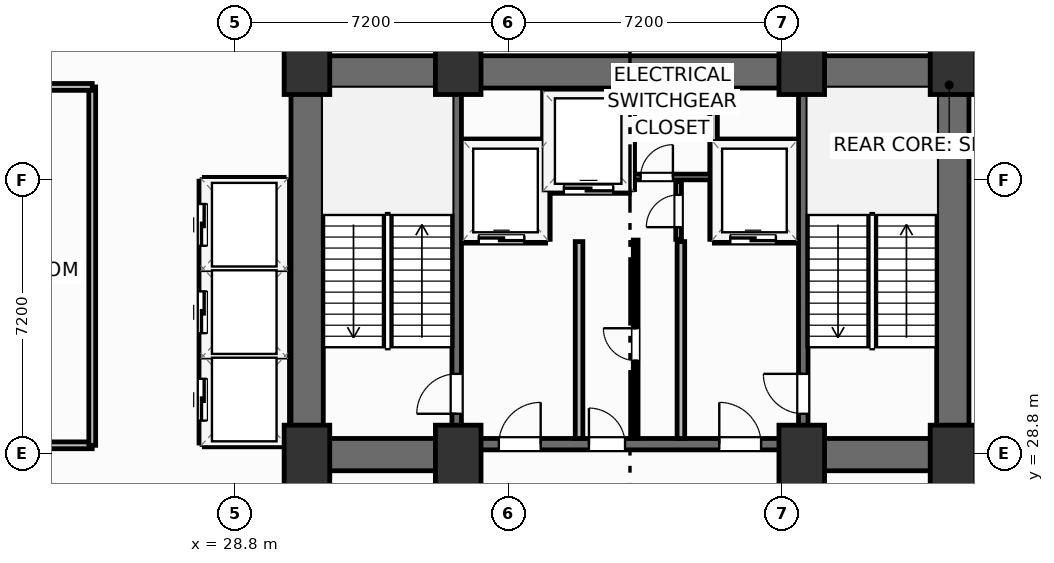
"""IFC4 building model, lengths in metres.
Left out: names, types, materials, properties, quantities, classifications, styles, units other than length and angle.
Written with IfcOpenShell. Run it as: python <this file> out.ifc"""

import sys

from ifc_helpers import new_model, si_unit, direction, frame, frame_2d, origin, origin_2d, place, context, subcontext, project, spatial, rectangle, extrude, element, fill, save


model = new_model("IFC4")
c1 = context("Model", 3, precision=1e-05, world=origin(), true_north=direction((0.0, 1.0)))
c2 = subcontext(c1, "Body", "Model", "MODEL_VIEW")
j1 = project(units=[si_unit("LENGTHUNIT", "METRE"), si_unit("PLANEANGLEUNIT", "RADIAN")], contexts=[c1])
p1 = place(None, origin())
s1 = spatial("IfcSite", under=j1, at=p1, CompositionType="ELEMENT")
p2 = place(p1, origin())
s2 = spatial("IfcBuilding", under=s1, at=p2, CompositionType="ELEMENT")
p3 = place(p2, frame((0.0, 0.0, -9.0)))
s3 = spatial("IfcBuildingStorey", under=s2, at=p3, CompositionType="ELEMENT", Elevation=-9.0)
for number, where, z_axis, x_axis in (
    (1, (30.7, 28.75, 0.0), (0.0, 0.0, 1.0), (1.0, 0.0, 0.0)),
    (2, (34.68, 28.75, 0.0), (0.0, 0.0, 1.0), (1.0, 0.0, 0.0)),
    (3, (43.72, 28.75, 0.0), (0.0, 0.0, 1.0), (1.0, 0.0, 0.0)),
    (4, (47.7, 28.75, 0.0), (0.0, 0.0, 1.0), (1.0, 0.0, 0.0)),
    (5, (30.7, 39.05, 0.0), (0.0, 0.0, 1.0), (1.0, 0.0, 0.0)),
    (6, (34.68, 39.05, 0.0), (0.0, 0.0, 1.0), (1.0, 0.0, 0.0)),
    (7, (43.72, 39.05, 0.0), (0.0, 0.0, 1.0), (1.0, 0.0, 0.0)),
    (8, (47.7, 39.05, 0.0), (0.0, 0.0, 1.0), (1.0, 0.0, 0.0)),
):
    element("IfcColumn", number, at=place(p3, frame(where, z_axis=z_axis, x_axis=x_axis)), inside=s3, PredefinedType="COLUMN", context=c2, shape_type="SweptSolid", body=[
        extrude(rectangle(XDim=1.2, YDim=1.6, at=origin_2d()), origin(), (0.0, 0.0, 1.0), 4.5),
    ])
p4 = place(p3, frame((30.28, 38.845, 0.0), z_axis=(0.0, 0.0, 1.0), x_axis=(1.0, 0.0, 0.0)))
e9 = element("IfcWall", 9, at=p4, inside=s3, PredefinedType="SHEAR", context=c2, shape_type="SweptSolid", body=[
    extrude(rectangle(XDim=17.84, YDim=0.85, at=frame_2d((8.92, 0.0))), origin(), (0.0, 0.0, 1.0), 4.2),
])
for number, where, z_axis, x_axis in (
    (10, (30.705, 29.2, 0.0), (0.0, 0.0, 1.0), (0.0, 1.0, 0.0)),
    (11, (47.695, 29.2, 0.0), (0.0, 0.0, 1.0), (0.0, 1.0, 0.0)),
):
    element("IfcWall", number, at=place(p3, frame(where, z_axis=z_axis, x_axis=x_axis)), inside=s3, PredefinedType="SHEAR", context=c2, shape_type="SweptSolid", body=[
        extrude(rectangle(XDim=9.22, YDim=0.85, at=frame_2d((4.61, 0.0))), origin(), (0.0, 0.0, 1.0), 4.2),
    ])
for number, where, z_axis, x_axis in (
    (12, (30.28, 28.775, 0.0), (0.0, 0.0, 1.0), (1.0, 0.0, 0.0)),
    (13, (43.6, 28.775, 0.0), (0.0, 0.0, 1.0), (1.0, 0.0, 0.0)),
):
    element("IfcWall", number, at=place(p3, frame(where, z_axis=z_axis, x_axis=x_axis)), inside=s3, PredefinedType="SHEAR", context=c2, shape_type="SweptSolid", body=[
        extrude(rectangle(XDim=4.52, YDim=0.85, at=frame_2d((2.26, 0.0))), origin(), (0.0, 0.0, 1.0), 4.2),
    ])
p5 = place(p3, frame((34.8, 29.05, 0.0), z_axis=(0.0, 0.0, 1.0), x_axis=(1.0, 0.0, 0.0)))
e14 = element("IfcWall", 14, at=p5, inside=s3, PredefinedType="SHEAR", context=c2, shape_type="SweptSolid", body=[
    extrude(rectangle(XDim=8.8, YDim=0.3, at=frame_2d((4.4, 0.0))), origin(), (0.0, 0.0, 1.0), 4.2),
])
p6 = place(p5, frame((0.95, 0.0, 0.0)))
e15 = element("IfcOpeningElement", 15, at=p6, cuts=e14, PredefinedType="OPENING", context=c2, shape_type="SweptSolid", body=[
    extrude(rectangle(XDim=1.1, YDim=2.15, at=frame_2d((0.55, 1.075))), frame((0.0, 0.16, 0.0), z_axis=(0.0, -1.0, 0.0), x_axis=(1.0, 0.0, 0.0)), (0.0, 0.0, 1.0), 0.32),
])
p7 = place(p5, frame((6.75, 0.0, 0.0)))
e16 = element("IfcOpeningElement", 16, at=p7, cuts=e14, PredefinedType="OPENING", context=c2, shape_type="SweptSolid", body=[
    extrude(rectangle(XDim=1.1, YDim=2.15, at=frame_2d((0.55, 1.075))), frame((0.0, 0.16, 0.0), z_axis=(0.0, -1.0, 0.0), x_axis=(1.0, 0.0, 0.0)), (0.0, 0.0, 1.0), 0.32),
])
p8 = place(p5, frame((3.32, 0.0, 0.0)))
e17 = element("IfcOpeningElement", 17, at=p8, cuts=e14, PredefinedType="OPENING", context=c2, shape_type="SweptSolid", body=[
    extrude(rectangle(XDim=0.95, YDim=2.15, at=frame_2d((0.475, 1.075))), frame((0.0, 0.16, 0.0), z_axis=(0.0, -1.0, 0.0), x_axis=(1.0, 0.0, 0.0)), (0.0, 0.0, 1.0), 0.32),
])
p9 = place(p3, frame((34.64, 29.2, 0.0), z_axis=(0.0, 0.0, 1.0), x_axis=(0.0, 1.0, 0.0)))
e18 = element("IfcWall", 18, at=p9, inside=s3, PredefinedType="SHEAR", context=c2, shape_type="SweptSolid", body=[
    extrude(rectangle(XDim=9.22, YDim=0.25, at=frame_2d((4.61, 0.0))), origin(), (0.0, 0.0, 1.0), 4.2),
])
p10 = place(p9, frame((0.65, 0.0, 0.0)))
e19 = element("IfcOpeningElement", 19, at=p10, cuts=e18, PredefinedType="OPENING", context=c2, shape_type="SweptSolid", body=[
    extrude(rectangle(XDim=1.05, YDim=2.15, at=frame_2d((0.525, 1.075))), frame((0.0, 0.135, 0.0), z_axis=(0.0, -1.0, 0.0), x_axis=(1.0, 0.0, 0.0)), (0.0, 0.0, 1.0), 0.27),
])
p11 = place(p3, frame((43.76, 29.2, 0.0), z_axis=(0.0, 0.0, 1.0), x_axis=(0.0, 1.0, 0.0)))
e20 = element("IfcWall", 20, at=p11, inside=s3, PredefinedType="SHEAR", context=c2, shape_type="SweptSolid", body=[
    extrude(rectangle(XDim=9.22, YDim=0.25, at=frame_2d((4.61, 0.0))), origin(), (0.0, 0.0, 1.0), 4.2),
])
p12 = place(p11, frame((0.65, 0.0, 0.0)))
e21 = element("IfcOpeningElement", 21, at=p12, cuts=e20, PredefinedType="OPENING", context=c2, shape_type="SweptSolid", body=[
    extrude(rectangle(XDim=1.05, YDim=2.15, at=frame_2d((0.525, 1.075))), frame((0.0, 0.135, 0.0), z_axis=(0.0, -1.0, 0.0), x_axis=(1.0, 0.0, 0.0)), (0.0, 0.0, 1.0), 0.27),
])
p13 = place(p3, frame((18.55, 29.02, 0.0), z_axis=(0.0, 0.0, 1.0), x_axis=(1.0, 0.0, 0.0)))
e22 = element("IfcWall", 22, at=p13, inside=s3, PredefinedType="PARTITIONING", context=c2, shape_type="SweptSolid", body=[
    extrude(rectangle(XDim=6.5, YDim=0.18, at=frame_2d((3.25, 0.0))), origin(), (0.0, 0.0, 1.0), 4.2),
])
p14 = place(p13, frame((2.2, 0.0, 0.0)))
e23 = element("IfcOpeningElement", 23, at=p14, cuts=e22, PredefinedType="OPENING", context=c2, shape_type="SweptSolid", body=[
    extrude(rectangle(XDim=1.6, YDim=2.05, at=frame_2d((0.8, 1.025))), frame((0.0, 0.1, 0.0), z_axis=(0.0, -1.0, 0.0), x_axis=(1.0, 0.0, 0.0)), (0.0, 0.0, 1.0), 0.2),
])
p15 = place(p3, frame((25.05, 29.02, 0.0), z_axis=(0.0, 0.0, 1.0), x_axis=(0.0, 1.0, 0.0)))
e24 = element("IfcWall", 24, at=p15, inside=s3, PredefinedType="PARTITIONING", context=c2, shape_type="SweptSolid", body=[
    extrude(rectangle(XDim=9.43, YDim=0.18, at=frame_2d((4.715, 0.0))), origin(), (0.0, 0.0, 1.0), 4.2),
])
p16 = place(p3, frame((18.55, 38.45, 0.0), z_axis=(0.0, 0.0, 1.0), x_axis=(1.0, 0.0, 0.0)))
e25 = element("IfcWall", 25, at=p16, inside=s3, PredefinedType="PARTITIONING", context=c2, shape_type="SweptSolid", body=[
    extrude(rectangle(XDim=6.5, YDim=0.18, at=frame_2d((3.25, 0.0))), origin(), (0.0, 0.0, 1.0), 4.2),
])
for number, where, z_axis, x_axis in (
    (26, (37.86, 29.2, 0.0), (0.0, 0.0, 1.0), (0.0, 1.0, 0.0)),
    (27, (40.54, 29.2, 0.0), (0.0, 0.0, 1.0), (0.0, 1.0, 0.0)),
):
    element("IfcWall", number, at=place(p3, frame(where, z_axis=z_axis, x_axis=x_axis)), inside=s3, PredefinedType="PARTITIONING", context=c2, shape_type="SweptSolid", body=[
        extrude(rectangle(XDim=5.18, YDim=0.2, at=frame_2d((2.59, 0.0))), origin(), (0.0, 0.0, 1.0), 4.2),
    ])
p17 = place(p3, frame((34.8, 34.44, 0.0), z_axis=(0.0, 0.0, 1.0), x_axis=(1.0, 0.0, 0.0)))
e28 = element("IfcWall", 28, at=p17, inside=s3, PredefinedType="PARTITIONING", context=c2, shape_type="SweptSolid", body=[
    extrude(rectangle(XDim=2.18, YDim=0.2, at=frame_2d((1.09, 0.0))), origin(), (0.0, 0.0, 1.0), 4.2),
])
p18 = place(p17, frame((0.42, 0.0, 0.0)))
e29 = element("IfcOpeningElement", 29, at=p18, cuts=e28, PredefinedType="OPENING", context=c2, shape_type="SweptSolid", body=[
    extrude(rectangle(XDim=1.2, YDim=2.2, at=frame_2d((0.6, 1.1))), frame((0.0, 0.11, 0.0), z_axis=(0.0, -1.0, 0.0), x_axis=(1.0, 0.0, 0.0)), (0.0, 0.0, 1.0), 0.22),
])
p19 = place(p3, frame((34.8, 36.98, 0.0), z_axis=(0.0, 0.0, 1.0), x_axis=(1.0, 0.0, 0.0)))
e30 = element("IfcWall", 30, at=p19, inside=s3, PredefinedType="PARTITIONING", context=c2, shape_type="SweptSolid", body=[
    extrude(rectangle(XDim=2.18, YDim=0.2, at=frame_2d((1.09, 0.0))), origin(), (0.0, 0.0, 1.0), 4.2),
])
p20 = place(p3, frame((37.0, 34.44, 0.0), z_axis=(0.0, 0.0, 1.0), x_axis=(0.0, 1.0, 0.0)))
e31 = element("IfcWall", 31, at=p20, inside=s3, PredefinedType="PARTITIONING", context=c2, shape_type="SweptSolid", body=[
    extrude(rectangle(XDim=3.9, YDim=0.2, at=frame_2d((1.95, 0.0))), origin(), (0.0, 0.0, 1.0), 4.2),
])
p21 = place(p3, frame((41.42, 34.44, 0.0), z_axis=(0.0, 0.0, 1.0), x_axis=(1.0, 0.0, 0.0)))
e32 = element("IfcWall", 32, at=p21, inside=s3, PredefinedType="PARTITIONING", context=c2, shape_type="SweptSolid", body=[
    extrude(rectangle(XDim=2.18, YDim=0.2, at=frame_2d((1.09, 0.0))), origin(), (0.0, 0.0, 1.0), 4.2),
])
p22 = place(p21, frame((0.42, 0.0, 0.0)))
e33 = element("IfcOpeningElement", 33, at=p22, cuts=e32, PredefinedType="OPENING", context=c2, shape_type="SweptSolid", body=[
    extrude(rectangle(XDim=1.2, YDim=2.2, at=frame_2d((0.6, 1.1))), frame((0.0, 0.11, 0.0), z_axis=(0.0, -1.0, 0.0), x_axis=(1.0, 0.0, 0.0)), (0.0, 0.0, 1.0), 0.22),
])
p23 = place(p3, frame((41.42, 36.98, 0.0), z_axis=(0.0, 0.0, 1.0), x_axis=(1.0, 0.0, 0.0)))
e34 = element("IfcWall", 34, at=p23, inside=s3, PredefinedType="PARTITIONING", context=c2, shape_type="SweptSolid", body=[
    extrude(rectangle(XDim=2.18, YDim=0.2, at=frame_2d((1.09, 0.0))), origin(), (0.0, 0.0, 1.0), 4.2),
])
p24 = place(p3, frame((41.4, 34.44, 0.0), z_axis=(0.0, 0.0, 1.0), x_axis=(0.0, 1.0, 0.0)))
e35 = element("IfcWall", 35, at=p24, inside=s3, PredefinedType="PARTITIONING", context=c2, shape_type="SweptSolid", body=[
    extrude(rectangle(XDim=3.9, YDim=0.2, at=frame_2d((1.95, 0.0))), origin(), (0.0, 0.0, 1.0), 4.2),
])
p25 = place(p3, frame((37.06, 35.75, 0.0), z_axis=(0.0, 0.0, 1.0), x_axis=(1.0, 0.0, 0.0)))
e36 = element("IfcWall", 36, at=p25, inside=s3, PredefinedType="PARTITIONING", context=c2, shape_type="SweptSolid", body=[
    extrude(rectangle(XDim=2.12, YDim=0.2, at=frame_2d((1.06, 0.0))), origin(), (0.0, 0.0, 1.0), 4.2),
])
p26 = place(p25, frame((0.4, 0.0, 0.0)))
e37 = element("IfcOpeningElement", 37, at=p26, cuts=e36, PredefinedType="OPENING", context=c2, shape_type="SweptSolid", body=[
    extrude(rectangle(XDim=1.3, YDim=2.2, at=frame_2d((0.65, 1.1))), frame((0.0, 0.11, 0.0), z_axis=(0.0, -1.0, 0.0), x_axis=(1.0, 0.0, 0.0)), (0.0, 0.0, 1.0), 0.22),
])
p27 = place(p3, frame((39.22, 35.75, 0.0), z_axis=(0.0, 0.0, 1.0), x_axis=(0.0, 1.0, 0.0)))
e38 = element("IfcWall", 38, at=p27, inside=s3, PredefinedType="PARTITIONING", context=c2, shape_type="SweptSolid", body=[
    extrude(rectangle(XDim=2.59, YDim=0.2, at=frame_2d((1.295, 0.0))), origin(), (0.0, 0.0, 1.0), 4.2),
])
p28 = place(p3, frame((39.3, 36.08, 0.0), z_axis=(0.0, 0.0, 1.0), x_axis=(1.0, 0.0, 0.0)))
e39 = element("IfcWall", 39, at=p28, inside=s3, PredefinedType="PARTITIONING", context=c2, shape_type="SweptSolid", body=[
    extrude(rectangle(XDim=2.02, YDim=0.15, at=frame_2d((1.01, 0.0))), origin(), (0.0, 0.0, 1.0), 4.2),
])
p29 = place(p28, frame((0.18, 0.0, 0.0)))
e40 = element("IfcOpeningElement", 40, at=p29, cuts=e39, PredefinedType="OPENING", context=c2, shape_type="SweptSolid", body=[
    extrude(rectangle(XDim=0.85, YDim=2.05, at=frame_2d((0.425, 1.025))), frame((0.0, 0.085, 0.0), z_axis=(0.0, -1.0, 0.0), x_axis=(1.0, 0.0, 0.0)), (0.0, 0.0, 1.0), 0.17),
])
p30 = place(p3, frame((40.48, 34.44, 0.0), z_axis=(0.0, 0.0, 1.0), x_axis=(0.0, 1.0, 0.0)))
e41 = element("IfcWall", 41, at=p30, inside=s3, PredefinedType="PARTITIONING", context=c2, shape_type="SweptSolid", body=[
    extrude(rectangle(XDim=1.52, YDim=0.15, at=frame_2d((0.76, 0.0))), origin(), (0.0, 0.0, 1.0), 4.2),
])
p31 = place(p30, frame((0.32, 0.0, 0.0)))
e42 = element("IfcOpeningElement", 42, at=p31, cuts=e41, PredefinedType="OPENING", context=c2, shape_type="SweptSolid", body=[
    extrude(rectangle(XDim=0.85, YDim=2.05, at=frame_2d((0.425, 1.025))), frame((0.0, 0.085, 0.0), z_axis=(0.0, -1.0, 0.0), x_axis=(1.0, 0.0, 0.0)), (0.0, 0.0, 1.0), 0.17),
])
p32 = place(p3, frame((39.35, 29.2, 0.0), z_axis=(0.0, 0.0, 1.0), x_axis=(0.0, 1.0, 0.0)))
e43 = element("IfcWall", 43, at=p32, inside=s3, PredefinedType="PARTITIONING", context=c2, shape_type="SweptSolid", body=[
    extrude(rectangle(XDim=5.22, YDim=0.125, at=frame_2d((2.61, 0.0))), origin(), (0.0, 0.0, 1.0), 4.2),
])
p33 = place(p32, frame((2.05, 0.0, 0.0)))
e44 = element("IfcOpeningElement", 44, at=p33, cuts=e43, PredefinedType="OPENING", context=c2, shape_type="SweptSolid", body=[
    extrude(rectangle(XDim=0.85, YDim=2.05, at=frame_2d((0.425, 1.025))), frame((0.0, 0.073, 0.0), z_axis=(0.0, -1.0, 0.0), x_axis=(1.0, 0.0, 0.0)), (0.0, 0.0, 1.0), 0.145),
])
for number, where, z_axis, x_axis in (
    (45, (28.02, 31.375, 0.0), (0.0, 0.0, 1.0), (1.0, 0.0, 0.0)),
    (46, (28.02, 33.675, 0.0), (0.0, 0.0, 1.0), (1.0, 0.0, 0.0)),
):
    element("IfcWall", number, at=place(p3, frame(where, z_axis=z_axis, x_axis=x_axis)), inside=s3, PredefinedType="PARTITIONING", context=c2, shape_type="SweptSolid", body=[
        extrude(rectangle(XDim=2.06, YDim=0.2, at=frame_2d((1.03, 0.0))), origin(), (0.0, 0.0, 1.0), 4.2),
    ])
for number, where, z_axis, x_axis in (
    (47, (28.0, 29.08, 0.0), (0.0, 0.0, 1.0), (1.0, 0.0, 0.0)),
    (48, (28.0, 35.97, 0.0), (0.0, 0.0, 1.0), (1.0, 0.0, 0.0)),
):
    element("IfcWall", number, at=place(p3, frame(where, z_axis=z_axis, x_axis=x_axis)), inside=s3, PredefinedType="PARTITIONING", context=c2, shape_type="SweptSolid", body=[
        extrude(rectangle(XDim=2.1, YDim=0.2, at=frame_2d((1.05, 0.0))), origin(), (0.0, 0.0, 1.0), 4.2),
    ])
p34 = place(p3, frame((30.12, 29.08, 0.0), z_axis=(0.0, 0.0, 1.0), x_axis=(0.0, 1.0, 0.0)))
e49 = element("IfcWall", 49, at=p34, inside=s3, PredefinedType="PARTITIONING", context=c2, shape_type="SweptSolid", body=[
    extrude(rectangle(XDim=6.89, YDim=0.2, at=frame_2d((3.445, 0.0))), origin(), (0.0, 0.0, 1.0), 4.2),
])
p35 = place(p3, frame((27.96, 29.08, 0.0), z_axis=(0.0, 0.0, 1.0), x_axis=(0.0, 1.0, 0.0)))
e50 = element("IfcWall", 50, at=p35, inside=s3, PredefinedType="PARTITIONING", context=c2, shape_type="SweptSolid", body=[
    extrude(rectangle(XDim=6.89, YDim=0.2, at=frame_2d((3.445, 0.0))), origin(), (0.0, 0.0, 1.0), 4.2),
])
p36 = place(p35, frame((0.59, 0.0, 0.0)))
e51 = element("IfcOpeningElement", 51, at=p36, cuts=e50, PredefinedType="OPENING", context=c2, shape_type="SweptSolid", body=[
    extrude(rectangle(XDim=1.1, YDim=2.15, at=frame_2d((0.55, 1.075))), frame((0.0, 0.11, 0.0), z_axis=(0.0, -1.0, 0.0), x_axis=(1.0, 0.0, 0.0)), (0.0, 0.0, 1.0), 0.22),
])
p37 = place(p35, frame((2.89, 0.0, 0.0)))
e52 = element("IfcOpeningElement", 52, at=p37, cuts=e50, PredefinedType="OPENING", context=c2, shape_type="SweptSolid", body=[
    extrude(rectangle(XDim=1.1, YDim=2.15, at=frame_2d((0.55, 1.075))), frame((0.0, 0.11, 0.0), z_axis=(0.0, -1.0, 0.0), x_axis=(1.0, 0.0, 0.0)), (0.0, 0.0, 1.0), 0.22),
])
p38 = place(p35, frame((5.19, 0.0, 0.0)))
e53 = element("IfcOpeningElement", 53, at=p38, cuts=e50, PredefinedType="OPENING", context=c2, shape_type="SweptSolid", body=[
    extrude(rectangle(XDim=1.1, YDim=2.15, at=frame_2d((0.55, 1.075))), frame((0.0, 0.11, 0.0), z_axis=(0.0, -1.0, 0.0), x_axis=(1.0, 0.0, 0.0)), (0.0, 0.0, 1.0), 0.22),
])
p39 = place(p10, origin())
e54 = element("IfcDoor", 54, at=p39, inside=s3, OperationType="SINGLE_SWING_LEFT", PredefinedType="DOOR", context=c2, shape_type="SweptSolid", body=[
    extrude(rectangle(XDim=1.05, YDim=2.15, at=frame_2d((0.525, 1.075))), frame((0.0, 0.025, 0.0), z_axis=(0.0, -1.0, 0.0), x_axis=(1.0, 0.0, 0.0)), (0.0, 0.0, 1.0), 0.05),
])
fill(e19, e54)
p40 = place(p12, origin())
e55 = element("IfcDoor", 55, at=p40, inside=s3, OperationType="SINGLE_SWING_RIGHT", PredefinedType="DOOR", context=c2, shape_type="SweptSolid", body=[
    extrude(rectangle(XDim=1.05, YDim=2.15, at=frame_2d((0.525, 1.075))), frame((0.0, 0.025, 0.0), z_axis=(0.0, -1.0, 0.0), x_axis=(1.0, 0.0, 0.0)), (0.0, 0.0, 1.0), 0.05),
])
fill(e21, e55)
p41 = place(p6, origin())
e56 = element("IfcDoor", 56, at=p41, inside=s3, OperationType="SINGLE_SWING_RIGHT", PredefinedType="DOOR", context=c2, shape_type="SweptSolid", body=[
    extrude(rectangle(XDim=1.1, YDim=2.15, at=frame_2d((0.55, 1.075))), frame((0.0, 0.025, 0.0), z_axis=(0.0, -1.0, 0.0), x_axis=(1.0, 0.0, 0.0)), (0.0, 0.0, 1.0), 0.05),
])
fill(e15, e56)
p42 = place(p7, origin())
e57 = element("IfcDoor", 57, at=p42, inside=s3, OperationType="SINGLE_SWING_LEFT", PredefinedType="DOOR", context=c2, shape_type="SweptSolid", body=[
    extrude(rectangle(XDim=1.1, YDim=2.15, at=frame_2d((0.55, 1.075))), frame((0.0, 0.025, 0.0), z_axis=(0.0, -1.0, 0.0), x_axis=(1.0, 0.0, 0.0)), (0.0, 0.0, 1.0), 0.05),
])
fill(e16, e57)
p43 = place(p18, origin())
e58 = element("IfcDoor", 58, at=p43, inside=s3, OperationType="SLIDING_TO_LEFT", PredefinedType="DOOR", context=c2, shape_type="SweptSolid", body=[
    extrude(rectangle(XDim=1.2, YDim=2.2, at=frame_2d((0.6, 1.1))), frame((0.0, 0.025, 0.0), z_axis=(0.0, -1.0, 0.0), x_axis=(1.0, 0.0, 0.0)), (0.0, 0.0, 1.0), 0.05),
])
fill(e29, e58)
p44 = place(p22, origin())
e59 = element("IfcDoor", 59, at=p44, inside=s3, OperationType="SLIDING_TO_LEFT", PredefinedType="DOOR", context=c2, shape_type="SweptSolid", body=[
    extrude(rectangle(XDim=1.2, YDim=2.2, at=frame_2d((0.6, 1.1))), frame((0.0, 0.025, 0.0), z_axis=(0.0, -1.0, 0.0), x_axis=(1.0, 0.0, 0.0)), (0.0, 0.0, 1.0), 0.05),
])
fill(e33, e59)
p45 = place(p26, origin())
e60 = element("IfcDoor", 60, at=p45, inside=s3, OperationType="SLIDING_TO_LEFT", PredefinedType="DOOR", context=c2, shape_type="SweptSolid", body=[
    extrude(rectangle(XDim=1.3, YDim=2.2, at=frame_2d((0.65, 1.1))), frame((0.0, 0.025, 0.0), z_axis=(0.0, -1.0, 0.0), x_axis=(1.0, 0.0, 0.0)), (0.0, 0.0, 1.0), 0.05),
])
fill(e37, e60)
p46 = place(p29, origin())
e61 = element("IfcDoor", 61, at=p46, inside=s3, OperationType="SINGLE_SWING_RIGHT", PredefinedType="DOOR", context=c2, shape_type="SweptSolid", body=[
    extrude(rectangle(XDim=0.85, YDim=2.05, at=frame_2d((0.425, 1.025))), frame((0.0, 0.025, 0.0), z_axis=(0.0, -1.0, 0.0), x_axis=(1.0, 0.0, 0.0)), (0.0, 0.0, 1.0), 0.05),
])
fill(e40, e61)
p47 = place(p31, origin())
e62 = element("IfcDoor", 62, at=p47, inside=s3, OperationType="SINGLE_SWING_LEFT", PredefinedType="DOOR", context=c2, shape_type="SweptSolid", body=[
    extrude(rectangle(XDim=0.85, YDim=2.05, at=frame_2d((0.425, 1.025))), frame((0.0, 0.025, 0.0), z_axis=(0.0, -1.0, 0.0), x_axis=(1.0, 0.0, 0.0)), (0.0, 0.0, 1.0), 0.05),
])
fill(e42, e62)
p48 = place(p33, origin())
e63 = element("IfcDoor", 63, at=p48, inside=s3, OperationType="SINGLE_SWING_RIGHT", PredefinedType="DOOR", context=c2, shape_type="SweptSolid", body=[
    extrude(rectangle(XDim=0.85, YDim=2.05, at=frame_2d((0.425, 1.025))), frame((0.0, 0.025, 0.0), z_axis=(0.0, -1.0, 0.0), x_axis=(1.0, 0.0, 0.0)), (0.0, 0.0, 1.0), 0.05),
])
fill(e44, e63)
p49 = place(p8, origin())
e64 = element("IfcDoor", 64, at=p49, inside=s3, OperationType="SINGLE_SWING_LEFT", PredefinedType="DOOR", context=c2, shape_type="SweptSolid", body=[
    extrude(rectangle(XDim=0.95, YDim=2.15, at=frame_2d((0.475, 1.075))), frame((0.0, 0.025, 0.0), z_axis=(0.0, -1.0, 0.0), x_axis=(1.0, 0.0, 0.0)), (0.0, 0.0, 1.0), 0.05),
])
fill(e17, e64)
p50 = place(p36, origin())
e65 = element("IfcDoor", 65, at=p50, inside=s3, OperationType="SLIDING_TO_LEFT", PredefinedType="DOOR", context=c2, shape_type="SweptSolid", body=[
    extrude(rectangle(XDim=1.1, YDim=2.15, at=frame_2d((0.55, 1.075))), frame((0.0, 0.025, 0.0), z_axis=(0.0, -1.0, 0.0), x_axis=(1.0, 0.0, 0.0)), (0.0, 0.0, 1.0), 0.05),
])
fill(e51, e65)
p51 = place(p37, origin())
e66 = element("IfcDoor", 66, at=p51, inside=s3, OperationType="SLIDING_TO_LEFT", PredefinedType="DOOR", context=c2, shape_type="SweptSolid", body=[
    extrude(rectangle(XDim=1.1, YDim=2.15, at=frame_2d((0.55, 1.075))), frame((0.0, 0.025, 0.0), z_axis=(0.0, -1.0, 0.0), x_axis=(1.0, 0.0, 0.0)), (0.0, 0.0, 1.0), 0.05),
])
fill(e52, e66)
p52 = place(p38, origin())
e67 = element("IfcDoor", 67, at=p52, inside=s3, OperationType="SLIDING_TO_LEFT", PredefinedType="DOOR", context=c2, shape_type="SweptSolid", body=[
    extrude(rectangle(XDim=1.1, YDim=2.15, at=frame_2d((0.55, 1.075))), frame((0.0, 0.025, 0.0), z_axis=(0.0, -1.0, 0.0), x_axis=(1.0, 0.0, 0.0)), (0.0, 0.0, 1.0), 0.05),
])
fill(e53, e67)
save(model, sys.argv[1])
